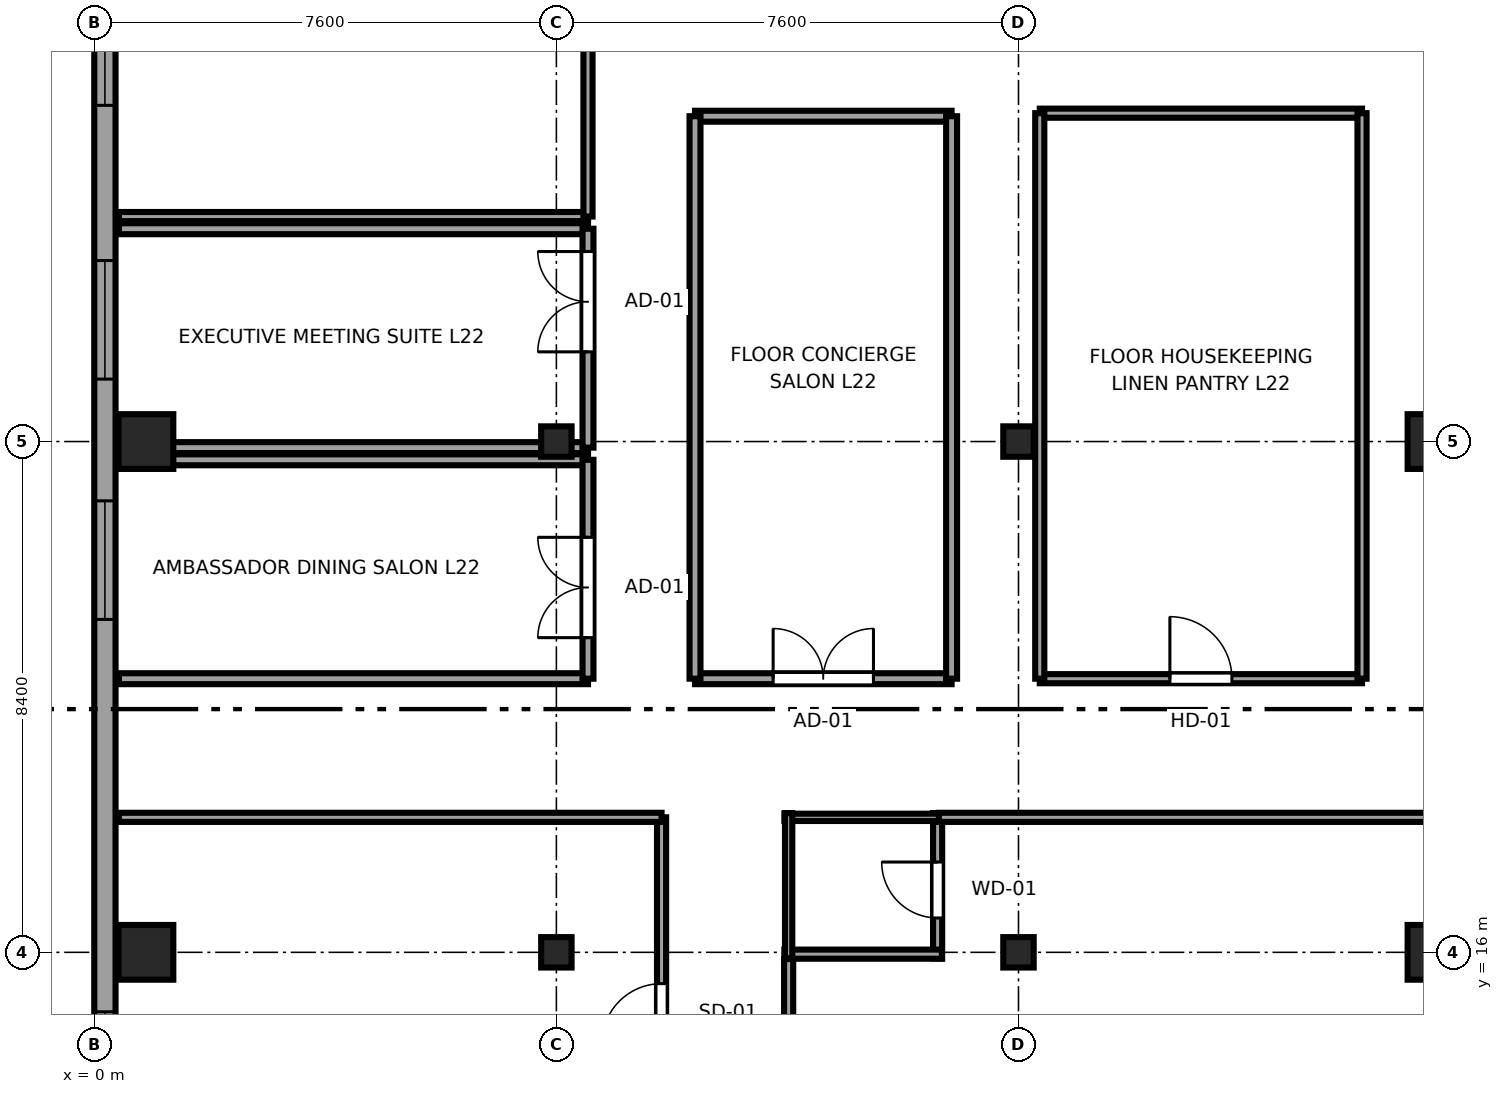
"""IFC4 building model, lengths in metres.
Left out: names, types, materials, properties, quantities, classifications, styles, units other than length and angle.
Written with IfcOpenShell. Run it as: python <this file> out.ifc"""

import sys

from ifc_helpers import new_model, si_unit, direction, frame, frame_2d, origin, origin_2d, place, context, subcontext, project, spatial, rectangle, i_section, extrude, source, transform, mapped, element, fill, save


model = new_model("IFC4")
c1 = context("Model", 3, precision=1e-05, world=origin(), true_north=direction((0.0, 1.0)))
c2 = subcontext(c1, "Body", "Model", "MODEL_VIEW")
j1 = project(units=[si_unit("LENGTHUNIT", "METRE"), si_unit("PLANEANGLEUNIT", "RADIAN")], contexts=[c1])
p1 = place(None, origin())
s1 = spatial("IfcSite", under=j1, at=p1, CompositionType="ELEMENT")
p2 = place(p1, origin())
s2 = spatial("IfcBuilding", under=s1, at=p2, CompositionType="ELEMENT")
p3 = place(p2, frame((0.0, 0.0, 88.8)))
s3 = spatial("IfcBuildingStorey", under=s2, at=p3, CompositionType="ELEMENT", Elevation=88.8)
m1 = source(origin(), c2, "Body", "SweptSolid", [
    extrude(rectangle(XDim=0.9, YDim=0.9, at=origin_2d()), origin(), (0.0, 0.0, 1.0), 3.55),
])
for number, where, z_axis, x_axis in (
    (1, (0.85, 16.0, 0.0), (0.0, 0.0, 1.0), (1.0, 0.0, 0.0)),
    (2, (0.85, 24.4, 0.0), (0.0, 0.0, 1.0), (1.0, 0.0, 0.0)),
):
    element("IfcColumn", number, at=place(p3, frame(where, z_axis=z_axis, x_axis=x_axis)), inside=s3, PredefinedType="COLUMN", context=c2, shape_type="MappedRepresentation", body=[
        mapped(m1, transform((0.0, 0.0, 0.0), x_axis=(1.0, 0.0, 0.0), y_axis=(0.0, 1.0, 0.0), z_axis=(0.0, 0.0, 1.0), scale=1.0)),
    ])
m2 = source(origin(), c2, "Body", "SweptSolid", [
    extrude(i_section(OverallWidth=0.5, OverallDepth=0.5, WebThickness=0.022, FlangeThickness=0.034, at=origin_2d()), origin(), (0.0, 0.0, 1.0), 3.55),
])
for number, where, z_axis, x_axis in (
    (3, (7.6, 16.0, 0.0), (0.0, 0.0, 1.0), (1.0, 0.0, 0.0)),
    (4, (7.6, 24.4, 0.0), (0.0, 0.0, 1.0), (1.0, 0.0, 0.0)),
    (5, (15.2, 16.0, 0.0), (0.0, 0.0, 1.0), (1.0, 0.0, 0.0)),
    (6, (15.2, 24.4, 0.0), (0.0, 0.0, 1.0), (1.0, 0.0, 0.0)),
):
    element("IfcColumn", number, at=place(p3, frame(where, z_axis=z_axis, x_axis=x_axis)), inside=s3, PredefinedType="COLUMN", context=c2, shape_type="MappedRepresentation", body=[
        mapped(m2, transform((0.0, 0.0, 0.0), x_axis=(1.0, 0.0, 0.0), y_axis=(0.0, 1.0, 0.0), z_axis=(0.0, 0.0, 1.0), scale=1.0)),
    ])
for number, where, z_axis, x_axis in (
    (7, (22.05, 16.0, 0.0), (0.0, 0.0, 1.0), (1.0, 0.0, 0.0)),
    (8, (22.05, 24.4, 0.0), (0.0, 0.0, 1.0), (1.0, 0.0, 0.0)),
):
    element("IfcColumn", number, at=place(p3, frame(where, z_axis=z_axis, x_axis=x_axis)), inside=s3, PredefinedType="COLUMN", context=c2, shape_type="MappedRepresentation", body=[
        mapped(m1, transform((0.0, 0.0, 0.0), x_axis=(1.0, 0.0, 0.0), y_axis=(0.0, 1.0, 0.0), z_axis=(0.0, 0.0, 1.0), scale=1.0)),
    ])
p4 = place(p3, frame((0.175, 41.383, 0.0), z_axis=(0.0, 0.0, 1.0), x_axis=(0.0, -1.0, 0.0)))
e9 = element("IfcWall", 9, at=p4, inside=s3, PredefinedType="SOLIDWALL", context=c2, shape_type="SweptSolid", body=[
    extrude(rectangle(XDim=36.766, YDim=0.35, at=frame_2d((18.383, 0.0))), origin(), (0.0, 0.0, 1.0), 3.37),
])
p5 = place(p4, frame((1.601, 0.0, 0.68)))
e10 = element("IfcOpeningElement", 10, at=p5, cuts=e9, PredefinedType="OPENING", context=c2, shape_type="SweptSolid", body=[
    extrude(rectangle(XDim=1.95, YDim=1.82, at=frame_2d((0.975, 0.91))), frame((0.0, 0.185, 0.0), z_axis=(0.0, -1.0, 0.0), x_axis=(1.0, 0.0, 0.0)), (0.0, 0.0, 1.0), 0.37),
])
p6 = place(p4, frame((4.503, 0.0, 0.68)))
e11 = element("IfcOpeningElement", 11, at=p6, cuts=e9, PredefinedType="OPENING", context=c2, shape_type="SweptSolid", body=[
    extrude(rectangle(XDim=1.95, YDim=1.82, at=frame_2d((0.975, 0.91))), frame((0.0, 0.185, 0.0), z_axis=(0.0, -1.0, 0.0), x_axis=(1.0, 0.0, 0.0)), (0.0, 0.0, 1.0), 0.37),
])
p7 = place(p4, frame((9.504, 0.0, 0.68)))
e12 = element("IfcOpeningElement", 12, at=p7, cuts=e9, PredefinedType="OPENING", context=c2, shape_type="SweptSolid", body=[
    extrude(rectangle(XDim=1.95, YDim=1.82, at=frame_2d((0.975, 0.91))), frame((0.0, 0.185, 0.0), z_axis=(0.0, -1.0, 0.0), x_axis=(1.0, 0.0, 0.0)), (0.0, 0.0, 1.0), 0.37),
])
p8 = place(p4, frame((14.006, 0.0, 0.68)))
e13 = element("IfcOpeningElement", 13, at=p8, cuts=e9, PredefinedType="OPENING", context=c2, shape_type="SweptSolid", body=[
    extrude(rectangle(XDim=1.95, YDim=1.82, at=frame_2d((0.975, 0.91))), frame((0.0, 0.185, 0.0), z_axis=(0.0, -1.0, 0.0), x_axis=(1.0, 0.0, 0.0)), (0.0, 0.0, 1.0), 0.37),
])
p9 = place(p4, frame((17.958, 0.0, 0.68)))
e14 = element("IfcOpeningElement", 14, at=p9, cuts=e9, PredefinedType="OPENING", context=c2, shape_type="SweptSolid", body=[
    extrude(rectangle(XDim=1.95, YDim=1.82, at=frame_2d((0.975, 0.91))), frame((0.0, 0.185, 0.0), z_axis=(0.0, -1.0, 0.0), x_axis=(1.0, 0.0, 0.0)), (0.0, 0.0, 1.0), 0.37),
])
p10 = place(p4, frame((26.361, 0.0, 0.68)))
e15 = element("IfcOpeningElement", 15, at=p10, cuts=e9, PredefinedType="OPENING", context=c2, shape_type="SweptSolid", body=[
    extrude(rectangle(XDim=1.95, YDim=1.82, at=frame_2d((0.975, 0.91))), frame((0.0, 0.185, 0.0), z_axis=(0.0, -1.0, 0.0), x_axis=(1.0, 0.0, 0.0)), (0.0, 0.0, 1.0), 0.37),
])
p11 = place(p4, frame((29.263, 0.0, 0.68)))
e16 = element("IfcOpeningElement", 16, at=p11, cuts=e9, PredefinedType="OPENING", context=c2, shape_type="SweptSolid", body=[
    extrude(rectangle(XDim=1.95, YDim=1.82, at=frame_2d((0.975, 0.91))), frame((0.0, 0.185, 0.0), z_axis=(0.0, -1.0, 0.0), x_axis=(1.0, 0.0, 0.0)), (0.0, 0.0, 1.0), 0.37),
])
p12 = place(p4, frame((34.265, 0.0, 0.68)))
e17 = element("IfcOpeningElement", 17, at=p12, cuts=e9, PredefinedType="OPENING", context=c2, shape_type="SweptSolid", body=[
    extrude(rectangle(XDim=1.95, YDim=1.82, at=frame_2d((0.975, 0.91))), frame((0.0, 0.185, 0.0), z_axis=(0.0, -1.0, 0.0), x_axis=(1.0, 0.0, 0.0)), (0.0, 0.0, 1.0), 0.37),
])
p13 = place(p3, frame((13.87, 15.9, 0.0), z_axis=(0.0, 0.0, 1.0), x_axis=(0.0, 1.0, 0.0)))
e18 = element("IfcWall", 18, at=p13, inside=s3, PredefinedType="PARTITIONING", context=c2, shape_type="SweptSolid", body=[
    extrude(rectangle(XDim=2.39, YDim=0.15, at=frame_2d((1.195, 0.0))), origin(), (0.0, 0.0, 1.0), 3.37),
])
p14 = place(p13, frame((0.665, 0.0, 0.0)))
e19 = element("IfcOpeningElement", 19, at=p14, cuts=e18, PredefinedType="OPENING", context=c2, shape_type="SweptSolid", body=[
    extrude(rectangle(XDim=0.92, YDim=2.01, at=frame_2d((0.46, 1.005))), frame((0.0, 0.085, 0.0), z_axis=(0.0, -1.0, 0.0), x_axis=(1.0, 0.0, 0.0)), (0.0, 0.0, 1.0), 0.17),
])
p15 = place(p3, frame((11.35, 15.97, 0.0), z_axis=(0.0, 0.0, 1.0), x_axis=(1.0, 0.0, 0.0)))
e20 = element("IfcWall", 20, at=p15, inside=s3, PredefinedType="PARTITIONING", context=c2, shape_type="SweptSolid", body=[
    extrude(rectangle(XDim=2.59, YDim=0.15, at=frame_2d((1.295, 0.0))), origin(), (0.0, 0.0, 1.0), 2.748),
])
p16 = place(p3, frame((11.35, 18.22, 0.0), z_axis=(0.0, 0.0, 1.0), x_axis=(1.0, 0.0, 0.0)))
e21 = element("IfcWall", 21, at=p16, inside=s3, PredefinedType="PLUMBINGWALL", context=c2, shape_type="SweptSolid", body=[
    extrude(rectangle(XDim=2.59, YDim=0.12, at=frame_2d((1.295, 0.0))), origin(), (0.0, 0.0, 1.0), 3.37),
])
p17 = place(p3, frame((11.42, 15.9, 0.0), z_axis=(0.0, 0.0, 1.0), x_axis=(0.0, 1.0, 0.0)))
e22 = element("IfcWall", 22, at=p17, inside=s3, PredefinedType="PLUMBINGWALL", context=c2, shape_type="SweptSolid", body=[
    extrude(rectangle(XDim=2.39, YDim=0.12, at=frame_2d((1.195, 0.0))), origin(), (0.0, 0.0, 1.0), 2.954),
])
p18 = place(p3, frame((9.33, 11.81, 0.0), z_axis=(0.0, 0.0, 1.0), x_axis=(0.0, 1.0, 0.0)))
e23 = element("IfcWall", 23, at=p18, inside=s3, PredefinedType="PARTITIONING", context=c2, shape_type="SweptSolid", body=[
    extrude(rectangle(XDim=6.41, YDim=0.15, at=frame_2d((3.205, 0.0))), origin(), (0.0, 0.0, 1.0), 3.37),
])
p19 = place(p18, frame((2.695, 0.0, 0.0)))
e24 = element("IfcOpeningElement", 24, at=p19, cuts=e23, PredefinedType="OPENING", context=c2, shape_type="SweptSolid", body=[
    extrude(rectangle(XDim=0.98, YDim=2.12, at=frame_2d((0.49, 1.06))), frame((0.0, 0.085, 0.0), z_axis=(0.0, -1.0, 0.0), x_axis=(1.0, 0.0, 0.0)), (0.0, 0.0, 1.0), 0.17),
])
p20 = place(p3, frame((0.405, 18.22, 0.0), z_axis=(0.0, 0.0, 1.0), x_axis=(1.0, 0.0, 0.0)))
e25 = element("IfcWall", 25, at=p20, inside=s3, PredefinedType="PARTITIONING", context=c2, shape_type="SweptSolid", body=[
    extrude(rectangle(XDim=8.925, YDim=0.15, at=frame_2d((4.462, 0.0))), origin(), (0.0, 0.0, 1.0), 3.37),
])
p21 = place(p3, frame((11.42, 0.405, 0.0), z_axis=(0.0, 0.0, 1.0), x_axis=(0.0, 1.0, 0.0)))
e26 = element("IfcWall", 26, at=p21, inside=s3, PredefinedType="PARTITIONING", context=c2, shape_type="SweptSolid", body=[
    extrude(rectangle(XDim=15.485, YDim=0.15, at=frame_2d((7.742, 0.0))), origin(), (0.0, 0.0, 1.0), 2.954),
])
p22 = place(p21, frame((7.26, 0.0, 0.0)))
e27 = element("IfcOpeningElement", 27, at=p22, cuts=e26, PredefinedType="OPENING", context=c2, shape_type="SweptSolid", body=[
    extrude(rectangle(XDim=0.98, YDim=2.12, at=frame_2d((0.49, 1.06))), frame((0.0, 0.085, 0.0), z_axis=(0.0, -1.0, 0.0), x_axis=(1.0, 0.0, 0.0)), (0.0, 0.0, 1.0), 0.17),
])
p23 = place(p3, frame((13.89, 18.22, 0.0), z_axis=(0.0, 0.0, 1.0), x_axis=(1.0, 0.0, 0.0)))
e28 = element("IfcWall", 28, at=p23, inside=s3, PredefinedType="PARTITIONING", context=c2, shape_type="SweptSolid", body=[
    extrude(rectangle(XDim=8.46, YDim=0.15, at=frame_2d((4.23, 0.0))), origin(), (0.0, 0.0, 1.0), 3.37),
])
for number, where, z_axis, x_axis in (
    (29, (0.405, 20.5, 0.0), (0.0, 0.0, 1.0), (1.0, 0.0, 0.0)),
    (30, (0.405, 24.1, 0.0), (0.0, 0.0, 1.0), (1.0, 0.0, 0.0)),
):
    element("IfcWall", number, at=place(p3, frame(where, z_axis=z_axis, x_axis=x_axis)), inside=s3, PredefinedType="PARTITIONING", context=c2, shape_type="SweptSolid", body=[
        extrude(rectangle(XDim=7.715, YDim=0.18, at=frame_2d((3.857, 0.0))), origin(), (0.0, 0.0, 1.0), 3.37),
    ])
p24 = place(p3, frame((8.12, 20.5, 0.0), z_axis=(0.0, 0.0, 1.0), x_axis=(0.0, 1.0, 0.0)))
e31 = element("IfcWall", 31, at=p24, inside=s3, PredefinedType="PARTITIONING", context=c2, shape_type="SweptSolid", body=[
    extrude(rectangle(XDim=3.6, YDim=0.18, at=frame_2d((1.8, 0.0))), origin(), (0.0, 0.0, 1.0), 3.37),
])
p25 = place(p24, frame((0.675, 0.0, 0.0)))
e32 = element("IfcOpeningElement", 32, at=p25, cuts=e31, PredefinedType="OPENING", context=c2, shape_type="SweptSolid", body=[
    extrude(rectangle(XDim=1.65, YDim=2.15, at=frame_2d((0.825, 1.075))), frame((0.0, 0.1, 0.0), z_axis=(0.0, -1.0, 0.0), x_axis=(1.0, 0.0, 0.0)), (0.0, 0.0, 1.0), 0.2),
])
p26 = place(p3, frame((0.405, 24.3, 0.0), z_axis=(0.0, 0.0, 1.0), x_axis=(1.0, 0.0, 0.0)))
e33 = element("IfcWall", 33, at=p26, inside=s3, PredefinedType="PARTITIONING", context=c2, shape_type="SweptSolid", body=[
    extrude(rectangle(XDim=7.715, YDim=0.18, at=frame_2d((3.857, 0.0))), origin(), (0.0, 0.0, 1.0), 2.748),
])
p27 = place(p3, frame((0.405, 27.9, 0.0), z_axis=(0.0, 0.0, 1.0), x_axis=(1.0, 0.0, 0.0)))
e34 = element("IfcWall", 34, at=p27, inside=s3, PredefinedType="PARTITIONING", context=c2, shape_type="SweptSolid", body=[
    extrude(rectangle(XDim=7.715, YDim=0.18, at=frame_2d((3.857, 0.0))), origin(), (0.0, 0.0, 1.0), 3.37),
])
p28 = place(p3, frame((8.12, 24.3, 0.0), z_axis=(0.0, 0.0, 1.0), x_axis=(0.0, 1.0, 0.0)))
e35 = element("IfcWall", 35, at=p28, inside=s3, PredefinedType="PARTITIONING", context=c2, shape_type="SweptSolid", body=[
    extrude(rectangle(XDim=3.6, YDim=0.18, at=frame_2d((1.8, 0.0))), origin(), (0.0, 0.0, 1.0), 3.37),
])
p29 = place(p28, frame((1.575, 0.0, 0.0)))
e36 = element("IfcOpeningElement", 36, at=p29, cuts=e35, PredefinedType="OPENING", context=c2, shape_type="SweptSolid", body=[
    extrude(rectangle(XDim=1.65, YDim=2.15, at=frame_2d((0.825, 1.075))), frame((0.0, 0.1, 0.0), z_axis=(0.0, -1.0, 0.0), x_axis=(1.0, 0.0, 0.0)), (0.0, 0.0, 1.0), 0.2),
])
p30 = place(p3, frame((0.405, 28.1, 0.0), z_axis=(0.0, 0.0, 1.0), x_axis=(1.0, 0.0, 0.0)))
e37 = element("IfcWall", 37, at=p30, inside=s3, PredefinedType="PARTITIONING", context=c2, shape_type="SweptSolid", body=[
    extrude(rectangle(XDim=7.715, YDim=0.15, at=frame_2d((3.857, 0.0))), origin(), (0.0, 0.0, 1.0), 3.37),
])
p31 = place(p3, frame((8.12, 28.1, 0.0), z_axis=(0.0, 0.0, 1.0), x_axis=(0.0, 1.0, 0.0)))
e38 = element("IfcWall", 38, at=p31, inside=s3, PredefinedType="PARTITIONING", context=c2, shape_type="SweptSolid", body=[
    extrude(rectangle(XDim=17.495, YDim=0.15, at=frame_2d((8.748, 0.0))), origin(), (0.0, 0.0, 1.0), 3.37),
])
p32 = place(p31, frame((7.923, 0.0, 0.0)))
e39 = element("IfcOpeningElement", 39, at=p32, cuts=e38, PredefinedType="OPENING", context=c2, shape_type="SweptSolid", body=[
    extrude(rectangle(XDim=1.65, YDim=2.15, at=frame_2d((0.825, 1.075))), frame((0.0, 0.085, 0.0), z_axis=(0.0, -1.0, 0.0), x_axis=(1.0, 0.0, 0.0)), (0.0, 0.0, 1.0), 0.17),
])
p33 = place(p3, frame((9.88, 20.5, 0.0), z_axis=(0.0, 0.0, 1.0), x_axis=(1.0, 0.0, 0.0)))
e40 = element("IfcWall", 40, at=p33, inside=s3, PredefinedType="PARTITIONING", context=c2, shape_type="SweptSolid", body=[
    extrude(rectangle(XDim=4.22, YDim=0.18, at=frame_2d((2.11, 0.0))), origin(), (0.0, 0.0, 1.0), 3.37),
])
p34 = place(p33, frame((1.285, 0.0, 0.0)))
e41 = element("IfcOpeningElement", 41, at=p34, cuts=e40, PredefinedType="OPENING", context=c2, shape_type="SweptSolid", body=[
    extrude(rectangle(XDim=1.65, YDim=2.15, at=frame_2d((0.825, 1.075))), frame((0.0, 0.1, 0.0), z_axis=(0.0, -1.0, 0.0), x_axis=(1.0, 0.0, 0.0)), (0.0, 0.0, 1.0), 0.2),
])
p35 = place(p3, frame((9.88, 29.75, 0.0), z_axis=(0.0, 0.0, 1.0), x_axis=(1.0, 0.0, 0.0)))
e42 = element("IfcWall", 42, at=p35, inside=s3, PredefinedType="PARTITIONING", context=c2, shape_type="SweptSolid", body=[
    extrude(rectangle(XDim=4.22, YDim=0.18, at=frame_2d((2.11, 0.0))), origin(), (0.0, 0.0, 1.0), 3.37),
])
for number, where, z_axis, x_axis in (
    (43, (9.88, 20.5, 0.0), (0.0, 0.0, 1.0), (0.0, 1.0, 0.0)),
    (44, (14.1, 20.5, 0.0), (0.0, 0.0, 1.0), (0.0, 1.0, 0.0)),
):
    element("IfcWall", number, at=place(p3, frame(where, z_axis=z_axis, x_axis=x_axis)), inside=s3, PredefinedType="PARTITIONING", context=c2, shape_type="SweptSolid", body=[
        extrude(rectangle(XDim=9.25, YDim=0.18, at=frame_2d((4.625, 0.0))), origin(), (0.0, 0.0, 1.0), 3.37),
    ])
p36 = place(p3, frame((15.55, 20.5, 0.0), z_axis=(0.0, 0.0, 1.0), x_axis=(1.0, 0.0, 0.0)))
e45 = element("IfcWall", 45, at=p36, inside=s3, PredefinedType="PARTITIONING", context=c2, shape_type="SweptSolid", body=[
    extrude(rectangle(XDim=5.3, YDim=0.15, at=frame_2d((2.65, 0.0))), origin(), (0.0, 0.0, 1.0), 3.37),
])
p37 = place(p36, frame((2.14, 0.0, 0.0)))
e46 = element("IfcOpeningElement", 46, at=p37, cuts=e45, PredefinedType="OPENING", context=c2, shape_type="SweptSolid", body=[
    extrude(rectangle(XDim=1.02, YDim=2.03, at=frame_2d((0.51, 1.015))), frame((0.0, 0.085, 0.0), z_axis=(0.0, -1.0, 0.0), x_axis=(1.0, 0.0, 0.0)), (0.0, 0.0, 1.0), 0.17),
])
p38 = place(p3, frame((15.55, 29.8, 0.0), z_axis=(0.0, 0.0, 1.0), x_axis=(1.0, 0.0, 0.0)))
e47 = element("IfcWall", 47, at=p38, inside=s3, PredefinedType="PARTITIONING", context=c2, shape_type="SweptSolid", body=[
    extrude(rectangle(XDim=5.3, YDim=0.15, at=frame_2d((2.65, 0.0))), origin(), (0.0, 0.0, 1.0), 3.37),
])
for number, where, z_axis, x_axis in (
    (48, (15.55, 20.5, 0.0), (0.0, 0.0, 1.0), (0.0, 1.0, 0.0)),
    (49, (20.85, 20.5, 0.0), (0.0, 0.0, 1.0), (0.0, 1.0, 0.0)),
):
    element("IfcWall", number, at=place(p3, frame(where, z_axis=z_axis, x_axis=x_axis)), inside=s3, PredefinedType="PARTITIONING", context=c2, shape_type="SweptSolid", body=[
        extrude(rectangle(XDim=9.3, YDim=0.15, at=frame_2d((4.65, 0.0))), origin(), (0.0, 0.0, 1.0), 3.37),
    ])
m3 = source(origin(), c2, "Body", "SweptSolid", [
    extrude(rectangle(XDim=1.95, YDim=1.82, at=frame_2d((0.975, 0.91))), frame((0.0, 0.09, 0.0), z_axis=(0.0, -1.0, 0.0), x_axis=(1.0, 0.0, 0.0)), (0.0, 0.0, 1.0), 0.06),
])
p39 = place(p7, origin())
e50 = element("IfcWindow", 50, at=p39, inside=s3, PartitioningType="DOUBLE_PANEL_VERTICAL", PredefinedType="WINDOW", context=c2, shape_type="MappedRepresentation", body=[
    mapped(m3, transform((0.0, 0.0, 0.0), x_axis=(1.0, 0.0, 0.0), y_axis=(0.0, 1.0, 0.0), z_axis=(0.0, 0.0, 1.0), scale=1.0)),
])
fill(e12, e50)
p40 = place(p8, origin())
e51 = element("IfcWindow", 51, at=p40, inside=s3, PartitioningType="DOUBLE_PANEL_VERTICAL", PredefinedType="WINDOW", context=c2, shape_type="MappedRepresentation", body=[
    mapped(m3, transform((0.0, 0.0, 0.0), x_axis=(1.0, 0.0, 0.0), y_axis=(0.0, 1.0, 0.0), z_axis=(0.0, 0.0, 1.0), scale=1.0)),
])
fill(e13, e51)
p41 = place(p9, origin())
e52 = element("IfcWindow", 52, at=p41, inside=s3, PartitioningType="DOUBLE_PANEL_VERTICAL", PredefinedType="WINDOW", context=c2, shape_type="MappedRepresentation", body=[
    mapped(m3, transform((0.0, 0.0, 0.0), x_axis=(1.0, 0.0, 0.0), y_axis=(0.0, 1.0, 0.0), z_axis=(0.0, 0.0, 1.0), scale=1.0)),
])
fill(e14, e52)
p42 = place(p10, origin())
e53 = element("IfcWindow", 53, at=p42, inside=s3, PartitioningType="DOUBLE_PANEL_VERTICAL", PredefinedType="WINDOW", context=c2, shape_type="MappedRepresentation", body=[
    mapped(m3, transform((0.0, 0.0, 0.0), x_axis=(1.0, 0.0, 0.0), y_axis=(0.0, 1.0, 0.0), z_axis=(0.0, 0.0, 1.0), scale=1.0)),
])
fill(e15, e53)
m4 = source(origin(), c2, "Body", "SweptSolid", [
    extrude(rectangle(XDim=0.92, YDim=2.01, at=frame_2d((0.46, 1.005))), frame((0.0, 0.025, 0.0), z_axis=(0.0, -1.0, 0.0), x_axis=(1.0, 0.0, 0.0)), (0.0, 0.0, 1.0), 0.05),
])
p43 = place(p14, origin())
e54 = element("IfcDoor", 54, at=p43, inside=s3, OperationType="SINGLE_SWING_RIGHT", PredefinedType="DOOR", context=c2, shape_type="MappedRepresentation", body=[
    mapped(m4, transform((0.0, 0.0, 0.0), x_axis=(1.0, 0.0, 0.0), y_axis=(0.0, 1.0, 0.0), z_axis=(0.0, 0.0, 1.0), scale=1.0)),
])
fill(e19, e54)
m5 = source(origin(), c2, "Body", "SweptSolid", [
    extrude(rectangle(XDim=0.98, YDim=2.12, at=frame_2d((0.49, 1.06))), frame((0.0, 0.025, 0.0), z_axis=(0.0, -1.0, 0.0), x_axis=(1.0, 0.0, 0.0)), (0.0, 0.0, 1.0), 0.05),
])
p44 = place(p19, origin())
e55 = element("IfcDoor", 55, at=p44, inside=s3, OperationType="SINGLE_SWING_LEFT", PredefinedType="DOOR", context=c2, shape_type="MappedRepresentation", body=[
    mapped(m5, transform((0.0, 0.0, 0.0), x_axis=(1.0, 0.0, 0.0), y_axis=(0.0, 1.0, 0.0), z_axis=(0.0, 0.0, 1.0), scale=1.0)),
])
fill(e24, e55)
m6 = source(origin(), c2, "Body", "SweptSolid", [
    extrude(rectangle(XDim=1.65, YDim=2.15, at=frame_2d((0.825, 1.075))), frame((0.0, 0.025, 0.0), z_axis=(0.0, -1.0, 0.0), x_axis=(1.0, 0.0, 0.0)), (0.0, 0.0, 1.0), 0.05),
])
p45 = place(p25, origin())
e56 = element("IfcDoor", 56, at=p45, inside=s3, OperationType="DOUBLE_DOOR_SINGLE_SWING", PredefinedType="DOOR", context=c2, shape_type="MappedRepresentation", body=[
    mapped(m6, transform((0.0, 0.0, 0.0), x_axis=(1.0, 0.0, 0.0), y_axis=(0.0, 1.0, 0.0), z_axis=(0.0, 0.0, 1.0), scale=1.0)),
])
fill(e32, e56)
p46 = place(p29, origin())
e57 = element("IfcDoor", 57, at=p46, inside=s3, OperationType="DOUBLE_DOOR_SINGLE_SWING", PredefinedType="DOOR", context=c2, shape_type="MappedRepresentation", body=[
    mapped(m6, transform((0.0, 0.0, 0.0), x_axis=(1.0, 0.0, 0.0), y_axis=(0.0, 1.0, 0.0), z_axis=(0.0, 0.0, 1.0), scale=1.0)),
])
fill(e36, e57)
p47 = place(p34, origin())
e58 = element("IfcDoor", 58, at=p47, inside=s3, OperationType="DOUBLE_DOOR_SINGLE_SWING", PredefinedType="DOOR", context=c2, shape_type="MappedRepresentation", body=[
    mapped(m6, transform((0.0, 0.0, 0.0), x_axis=(1.0, 0.0, 0.0), y_axis=(0.0, 1.0, 0.0), z_axis=(0.0, 0.0, 1.0), scale=1.0)),
])
fill(e41, e58)
m7 = source(origin(), c2, "Body", "SweptSolid", [
    extrude(rectangle(XDim=1.02, YDim=2.03, at=frame_2d((0.51, 1.015))), frame((0.0, 0.025, 0.0), z_axis=(0.0, -1.0, 0.0), x_axis=(1.0, 0.0, 0.0)), (0.0, 0.0, 1.0), 0.05),
])
p48 = place(p37, origin())
e59 = element("IfcDoor", 59, at=p48, inside=s3, OperationType="SINGLE_SWING_LEFT", PredefinedType="DOOR", context=c2, shape_type="MappedRepresentation", body=[
    mapped(m7, transform((0.0, 0.0, 0.0), x_axis=(1.0, 0.0, 0.0), y_axis=(0.0, 1.0, 0.0), z_axis=(0.0, 0.0, 1.0), scale=1.0)),
])
fill(e46, e59)
save(model, sys.argv[1])
